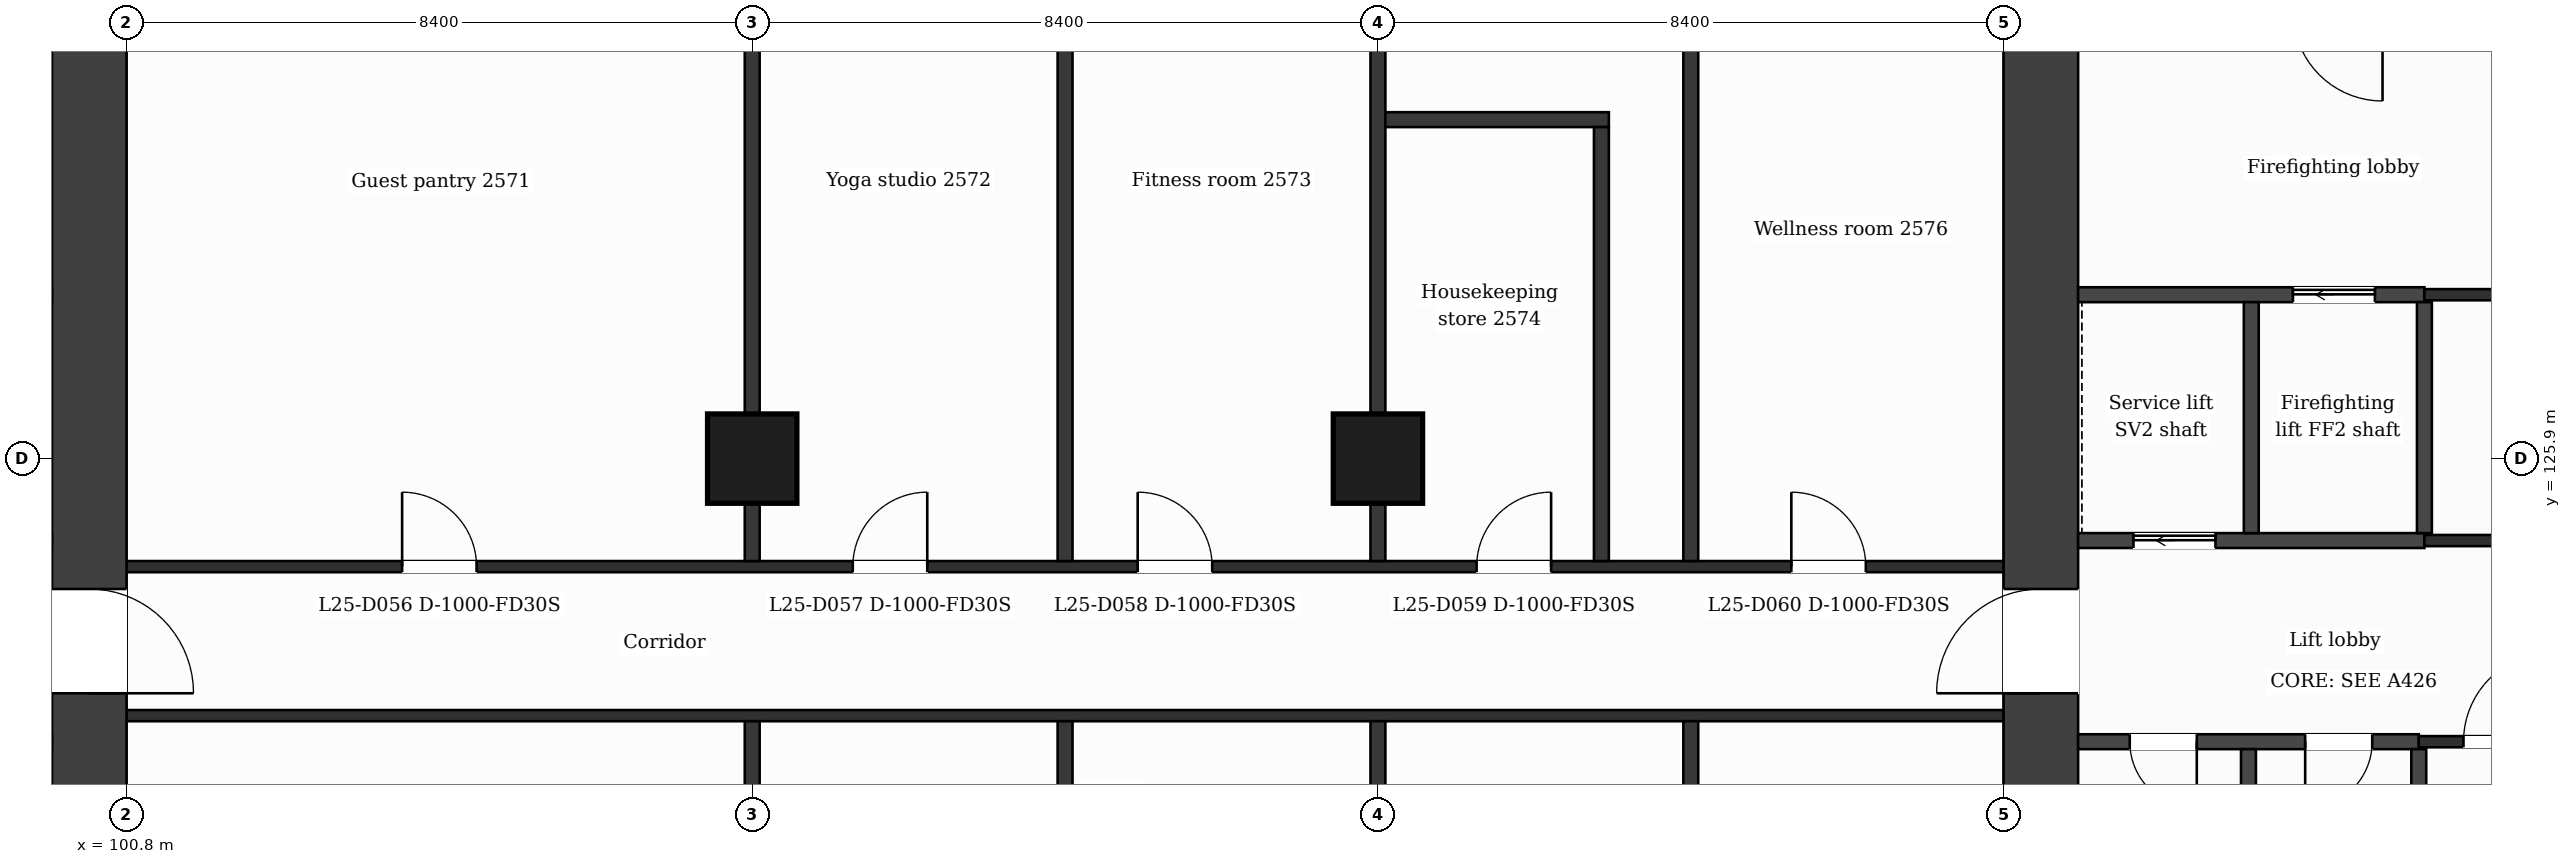
"""IFC4 building model, lengths in metres.
Left out: names, types, materials, properties, quantities, classifications, styles, units other than length and angle.
Written with IfcOpenShell. Run it as: python <this file> out.ifc"""

import sys

from ifc_helpers import new_model, si_unit, direction, frame, frame_2d, origin, origin_2d, place, context, subcontext, project, spatial, rectangle, extrude, element, fill, save


model = new_model("IFC4")
c1 = context("Model", 3, precision=1e-05, world=origin(), true_north=direction((0.0, 1.0)))
c2 = subcontext(c1, "Body", "Model", "MODEL_VIEW")
j1 = project(units=[si_unit("LENGTHUNIT", "METRE"), si_unit("PLANEANGLEUNIT", "RADIAN")], contexts=[c1])
p1 = place(None, origin())
s1 = spatial("IfcSite", under=j1, at=p1, CompositionType="ELEMENT")
p2 = place(p1, origin())
s2 = spatial("IfcBuilding", under=s1, at=p2, CompositionType="ELEMENT")
p3 = place(p2, frame((0.0, 0.0, 109.5)))
s3 = spatial("IfcBuildingStorey", under=s2, at=p3, CompositionType="ELEMENT", Elevation=109.5)
p4 = place(p3, frame((100.3, 131.9, 0.0), z_axis=(0.0, 0.0, 1.0), x_axis=(0.0, -1.0, 0.0)))
e1 = element("IfcWall", 1, at=p4, inside=s3, PredefinedType="SHEAR", context=c2, shape_type="SweptSolid", body=[
    extrude(rectangle(XDim=21.0, YDim=1.0, at=frame_2d((10.5, 0.0))), origin(), (0.0, 0.0, 1.0), 3.7),
])
p5 = place(p4, frame((7.75, 0.0, 0.0)))
e2 = element("IfcOpeningElement", 2, at=p5, cuts=e1, PredefinedType="OPENING", context=c2, shape_type="SweptSolid", body=[
    extrude(rectangle(XDim=1.4, YDim=2.1, at=frame_2d((0.7, 1.05))), frame((0.0, 0.51, 0.0), z_axis=(0.0, -1.0, 0.0), x_axis=(1.0, 0.0, 0.0)), (0.0, 0.0, 1.0), 1.02),
])
p6 = place(p3, frame((126.5, 110.9, 0.0), z_axis=(0.0, 0.0, 1.0), x_axis=(0.0, 1.0, 0.0)))
e3 = element("IfcWall", 3, at=p6, inside=s3, PredefinedType="SHEAR", context=c2, shape_type="SweptSolid", body=[
    extrude(rectangle(XDim=21.0, YDim=1.0, at=frame_2d((10.5, 0.0))), origin(), (0.0, 0.0, 1.0), 3.7),
])
p7 = place(p6, frame((11.85, 0.0, 0.0)))
e4 = element("IfcOpeningElement", 4, at=p7, cuts=e3, PredefinedType="OPENING", context=c2, shape_type="SweptSolid", body=[
    extrude(rectangle(XDim=1.4, YDim=2.1, at=frame_2d((0.7, 1.05))), frame((0.0, 0.51, 0.0), z_axis=(0.0, -1.0, 0.0), x_axis=(1.0, 0.0, 0.0)), (0.0, 0.0, 1.0), 1.02),
])
for number, where, z_axis, x_axis in (
    (5, (109.2, 125.9, 0.0), (0.0, 0.0, 1.0), (1.0, 0.0, 0.0)),
    (6, (117.6, 125.9, 0.0), (0.0, 0.0, 1.0), (1.0, 0.0, 0.0)),
):
    element("IfcColumn", number, at=place(p3, frame(where, z_axis=z_axis, x_axis=x_axis)), inside=s3, PredefinedType="COLUMN", context=c2, shape_type="SweptSolid", body=[
        extrude(rectangle(XDim=1.2, YDim=1.2, at=origin_2d()), origin(), (0.0, 0.0, 1.0), 3.7),
    ])
p8 = place(p3, frame((95.227, 122.1, 0.0), z_axis=(0.0, 0.0, 1.0), x_axis=(1.0, 0.0, 0.0)))
e7 = element("IfcWall", 7, at=p8, inside=s3, PredefinedType="PARTITIONING", context=c2, shape_type="SweptSolid", body=[
    extrude(rectangle(XDim=4.573, YDim=0.2, at=frame_2d((2.287, 0.0))), origin(), (0.0, 0.0, 1.0), 3.38),
])
p9 = place(p8, frame((0.693, 0.0, 0.0)))
e8 = element("IfcOpeningElement", 8, at=p9, cuts=e7, PredefinedType="OPENING", context=c2, shape_type="SweptSolid", body=[
    extrude(rectangle(XDim=0.9, YDim=2.1, at=frame_2d((0.45, 1.05))), frame((0.0, 0.11, 0.0), z_axis=(0.0, -1.0, 0.0), x_axis=(1.0, 0.0, 0.0)), (0.0, 0.0, 1.0), 0.22),
])
p10 = place(p8, frame((3.151, 0.0, 0.0)))
e9 = element("IfcOpeningElement", 9, at=p10, cuts=e7, PredefinedType="OPENING", context=c2, shape_type="SweptSolid", body=[
    extrude(rectangle(XDim=0.9, YDim=2.1, at=frame_2d((0.45, 1.05))), frame((0.0, 0.11, 0.0), z_axis=(0.0, -1.0, 0.0), x_axis=(1.0, 0.0, 0.0)), (0.0, 0.0, 1.0), 0.22),
])
p11 = place(p3, frame((127.0, 122.1, 0.0), z_axis=(0.0, 0.0, 1.0), x_axis=(1.0, 0.0, 0.0)))
e10 = element("IfcWall", 10, at=p11, inside=s3, PredefinedType="PARTITIONING", context=c2, shape_type="SweptSolid", body=[
    extrude(rectangle(XDim=4.573, YDim=0.2, at=frame_2d((2.287, 0.0))), origin(), (0.0, 0.0, 1.0), 3.38),
])
p12 = place(p11, frame((3.048, 0.0, 0.0)))
e11 = element("IfcOpeningElement", 11, at=p12, cuts=e10, PredefinedType="OPENING", context=c2, shape_type="SweptSolid", body=[
    extrude(rectangle(XDim=0.9, YDim=2.1, at=frame_2d((0.45, 1.05))), frame((0.0, 0.11, 0.0), z_axis=(0.0, -1.0, 0.0), x_axis=(1.0, 0.0, 0.0)), (0.0, 0.0, 1.0), 0.22),
])
p13 = place(p11, frame((0.693, 0.0, 0.0)))
e12 = element("IfcOpeningElement", 12, at=p13, cuts=e10, PredefinedType="OPENING", context=c2, shape_type="SweptSolid", body=[
    extrude(rectangle(XDim=0.9, YDim=2.1, at=frame_2d((0.45, 1.05))), frame((0.0, 0.11, 0.0), z_axis=(0.0, -1.0, 0.0), x_axis=(1.0, 0.0, 0.0)), (0.0, 0.0, 1.0), 0.22),
])
p14 = place(p3, frame((131.573, 122.1, 0.0), z_axis=(0.0, 0.0, 1.0), x_axis=(1.0, 0.0, 0.0)))
e13 = element("IfcWall", 13, at=p14, inside=s3, PredefinedType="PARTITIONING", context=c2, shape_type="SweptSolid", body=[
    extrude(rectangle(XDim=2.4, YDim=0.15, at=frame_2d((1.2, 0.0))), origin(), (0.0, 0.0, 1.0), 3.38),
])
p15 = place(p14, frame((0.6, 0.0, 0.0)))
e14 = element("IfcOpeningElement", 14, at=p15, cuts=e13, PredefinedType="OPENING", context=c2, shape_type="SweptSolid", body=[
    extrude(rectangle(XDim=1.2, YDim=2.1, at=frame_2d((0.6, 1.05))), frame((0.0, 0.085, 0.0), z_axis=(0.0, -1.0, 0.0), x_axis=(1.0, 0.0, 0.0)), (0.0, 0.0, 1.0), 0.17),
])
p16 = place(p3, frame((100.8, 122.45, 0.0), z_axis=(0.0, 0.0, 1.0), x_axis=(1.0, 0.0, 0.0)))
e15 = element("IfcWall", 15, at=p16, inside=s3, PredefinedType="PARTITIONING", context=c2, shape_type="SweptSolid", body=[
    extrude(rectangle(XDim=25.2, YDim=0.15, at=frame_2d((12.6, 0.0))), origin(), (0.0, 0.0, 1.0), 3.38),
])
p17 = place(p3, frame((100.8, 124.45, 0.0), z_axis=(0.0, 0.0, 1.0), x_axis=(1.0, 0.0, 0.0)))
e16 = element("IfcWall", 16, at=p17, inside=s3, PredefinedType="PARTITIONING", context=c2, shape_type="SweptSolid", body=[
    extrude(rectangle(XDim=25.2, YDim=0.15, at=frame_2d((12.6, 0.0))), origin(), (0.0, 0.0, 1.0), 3.38),
])
p18 = place(p17, frame((3.7, 0.0, 0.0)))
e17 = element("IfcOpeningElement", 17, at=p18, cuts=e16, PredefinedType="OPENING", context=c2, shape_type="SweptSolid", body=[
    extrude(rectangle(XDim=1.0, YDim=2.1, at=frame_2d((0.5, 1.05))), frame((0.0, 0.085, 0.0), z_axis=(0.0, -1.0, 0.0), x_axis=(1.0, 0.0, 0.0)), (0.0, 0.0, 1.0), 0.17),
])
p19 = place(p17, frame((9.75, 0.0, 0.0)))
e18 = element("IfcOpeningElement", 18, at=p19, cuts=e16, PredefinedType="OPENING", context=c2, shape_type="SweptSolid", body=[
    extrude(rectangle(XDim=1.0, YDim=2.1, at=frame_2d((0.5, 1.05))), frame((0.0, 0.085, 0.0), z_axis=(0.0, -1.0, 0.0), x_axis=(1.0, 0.0, 0.0)), (0.0, 0.0, 1.0), 0.17),
])
p20 = place(p17, frame((13.575, 0.0, 0.0)))
e19 = element("IfcOpeningElement", 19, at=p20, cuts=e16, PredefinedType="OPENING", context=c2, shape_type="SweptSolid", body=[
    extrude(rectangle(XDim=1.0, YDim=2.1, at=frame_2d((0.5, 1.05))), frame((0.0, 0.085, 0.0), z_axis=(0.0, -1.0, 0.0), x_axis=(1.0, 0.0, 0.0)), (0.0, 0.0, 1.0), 0.17),
])
p21 = place(p17, frame((18.125, 0.0, 0.0)))
e20 = element("IfcOpeningElement", 20, at=p21, cuts=e16, PredefinedType="OPENING", context=c2, shape_type="SweptSolid", body=[
    extrude(rectangle(XDim=1.0, YDim=2.1, at=frame_2d((0.5, 1.05))), frame((0.0, 0.085, 0.0), z_axis=(0.0, -1.0, 0.0), x_axis=(1.0, 0.0, 0.0)), (0.0, 0.0, 1.0), 0.17),
])
p22 = place(p17, frame((22.35, 0.0, 0.0)))
e21 = element("IfcOpeningElement", 21, at=p22, cuts=e16, PredefinedType="OPENING", context=c2, shape_type="SweptSolid", body=[
    extrude(rectangle(XDim=1.0, YDim=2.1, at=frame_2d((0.5, 1.05))), frame((0.0, 0.085, 0.0), z_axis=(0.0, -1.0, 0.0), x_axis=(1.0, 0.0, 0.0)), (0.0, 0.0, 1.0), 0.17),
])
p23 = place(p3, frame((127.0, 124.8, 0.0), z_axis=(0.0, 0.0, 1.0), x_axis=(1.0, 0.0, 0.0)))
e22 = element("IfcWall", 22, at=p23, inside=s3, PredefinedType="PARTITIONING", context=c2, shape_type="SweptSolid", body=[
    extrude(rectangle(XDim=4.649, YDim=0.2, at=frame_2d((2.324, 0.0))), origin(), (0.0, 0.0, 1.0), 3.38),
])
p24 = place(p23, frame((0.743, 0.0, 0.0)))
e23 = element("IfcOpeningElement", 23, at=p24, cuts=e22, PredefinedType="OPENING", context=c2, shape_type="SweptSolid", body=[
    extrude(rectangle(XDim=1.1, YDim=2.1, at=frame_2d((0.55, 1.05))), frame((0.0, 0.11, 0.0), z_axis=(0.0, -1.0, 0.0), x_axis=(1.0, 0.0, 0.0)), (0.0, 0.0, 1.0), 0.22),
])
p25 = place(p3, frame((131.649, 124.8, 0.0), z_axis=(0.0, 0.0, 1.0), x_axis=(1.0, 0.0, 0.0)))
e24 = element("IfcWall", 24, at=p25, inside=s3, PredefinedType="PARTITIONING", context=c2, shape_type="SweptSolid", body=[
    extrude(rectangle(XDim=2.449, YDim=0.15, at=frame_2d((1.225, 0.0))), origin(), (0.0, 0.0, 1.0), 3.38),
])
p26 = place(p3, frame((127.0, 128.1, 0.0), z_axis=(0.0, 0.0, 1.0), x_axis=(1.0, 0.0, 0.0)))
e25 = element("IfcWall", 25, at=p26, inside=s3, PredefinedType="PARTITIONING", context=c2, shape_type="SweptSolid", body=[
    extrude(rectangle(XDim=4.649, YDim=0.2, at=frame_2d((2.324, 0.0))), origin(), (0.0, 0.0, 1.0), 3.38),
])
p27 = place(p26, frame((2.884, 0.0, 0.0)))
e26 = element("IfcOpeningElement", 26, at=p27, cuts=e25, PredefinedType="OPENING", context=c2, shape_type="SweptSolid", body=[
    extrude(rectangle(XDim=1.1, YDim=2.1, at=frame_2d((0.55, 1.05))), frame((0.0, 0.11, 0.0), z_axis=(0.0, -1.0, 0.0), x_axis=(1.0, 0.0, 0.0)), (0.0, 0.0, 1.0), 0.22),
])
p28 = place(p3, frame((131.649, 128.1, 0.0), z_axis=(0.0, 0.0, 1.0), x_axis=(1.0, 0.0, 0.0)))
e27 = element("IfcWall", 27, at=p28, inside=s3, PredefinedType="PARTITIONING", context=c2, shape_type="SweptSolid", body=[
    extrude(rectangle(XDim=2.324, YDim=0.15, at=frame_2d((1.162, 0.0))), origin(), (0.0, 0.0, 1.0), 3.38),
])
p29 = place(p3, frame((117.6, 130.45, 0.0), z_axis=(0.0, 0.0, 1.0), x_axis=(1.0, 0.0, 0.0)))
e28 = element("IfcWall", 28, at=p29, inside=s3, PredefinedType="PARTITIONING", context=c2, shape_type="SweptSolid", body=[
    extrude(rectangle(XDim=3.1, YDim=0.2, at=frame_2d((1.55, 0.0))), origin(), (0.0, 0.0, 1.0), 3.38),
])
p30 = place(p3, frame((109.2, 109.075, 0.0), z_axis=(0.0, 0.0, 1.0), x_axis=(0.0, 1.0, 0.0)))
e29 = element("IfcWall", 29, at=p30, inside=s3, PredefinedType="PARTITIONING", context=c2, shape_type="SweptSolid", body=[
    extrude(rectangle(XDim=13.3, YDim=0.2, at=frame_2d((6.65, 0.0))), origin(), (0.0, 0.0, 1.0), 3.38),
])
p31 = place(p3, frame((109.2, 124.525, 0.0), z_axis=(0.0, 0.0, 1.0), x_axis=(0.0, 1.0, 0.0)))
e30 = element("IfcWall", 30, at=p31, inside=s3, PredefinedType="PARTITIONING", context=c2, shape_type="SweptSolid", body=[
    extrude(rectangle(XDim=9.2, YDim=0.2, at=frame_2d((4.6, 0.0))), origin(), (0.0, 0.0, 1.0), 3.38),
])
p32 = place(p3, frame((113.4, 109.075, 0.0), z_axis=(0.0, 0.0, 1.0), x_axis=(0.0, 1.0, 0.0)))
e31 = element("IfcWall", 31, at=p32, inside=s3, PredefinedType="PARTITIONING", context=c2, shape_type="SweptSolid", body=[
    extrude(rectangle(XDim=13.3, YDim=0.2, at=frame_2d((6.65, 0.0))), origin(), (0.0, 0.0, 1.0), 3.38),
])
p33 = place(p3, frame((113.4, 124.525, 0.0), z_axis=(0.0, 0.0, 1.0), x_axis=(0.0, 1.0, 0.0)))
e32 = element("IfcWall", 32, at=p33, inside=s3, PredefinedType="PARTITIONING", context=c2, shape_type="SweptSolid", body=[
    extrude(rectangle(XDim=9.2, YDim=0.2, at=frame_2d((4.6, 0.0))), origin(), (0.0, 0.0, 1.0), 3.38),
])
p34 = place(p3, frame((117.6, 109.075, 0.0), z_axis=(0.0, 0.0, 1.0), x_axis=(0.0, 1.0, 0.0)))
e33 = element("IfcWall", 33, at=p34, inside=s3, PredefinedType="PARTITIONING", context=c2, shape_type="SweptSolid", body=[
    extrude(rectangle(XDim=13.3, YDim=0.2, at=frame_2d((6.65, 0.0))), origin(), (0.0, 0.0, 1.0), 3.38),
])
p35 = place(p3, frame((117.6, 124.525, 0.0), z_axis=(0.0, 0.0, 1.0), x_axis=(0.0, 1.0, 0.0)))
e34 = element("IfcWall", 34, at=p35, inside=s3, PredefinedType="PARTITIONING", context=c2, shape_type="SweptSolid", body=[
    extrude(rectangle(XDim=9.2, YDim=0.2, at=frame_2d((4.6, 0.0))), origin(), (0.0, 0.0, 1.0), 3.38),
])
p36 = place(p3, frame((120.6, 124.525, 0.0), z_axis=(0.0, 0.0, 1.0), x_axis=(0.0, 1.0, 0.0)))
e35 = element("IfcWall", 35, at=p36, inside=s3, PredefinedType="PARTITIONING", context=c2, shape_type="SweptSolid", body=[
    extrude(rectangle(XDim=5.825, YDim=0.2, at=frame_2d((2.913, 0.0))), origin(), (0.0, 0.0, 1.0), 3.38),
])
p37 = place(p3, frame((121.8, 109.075, 0.0), z_axis=(0.0, 0.0, 1.0), x_axis=(0.0, 1.0, 0.0)))
e36 = element("IfcWall", 36, at=p37, inside=s3, PredefinedType="PARTITIONING", context=c2, shape_type="SweptSolid", body=[
    extrude(rectangle(XDim=13.3, YDim=0.2, at=frame_2d((6.65, 0.0))), origin(), (0.0, 0.0, 1.0), 3.38),
])
p38 = place(p3, frame((121.8, 124.525, 0.0), z_axis=(0.0, 0.0, 1.0), x_axis=(0.0, 1.0, 0.0)))
e37 = element("IfcWall", 37, at=p38, inside=s3, PredefinedType="PARTITIONING", context=c2, shape_type="SweptSolid", body=[
    extrude(rectangle(XDim=9.2, YDim=0.2, at=frame_2d((4.6, 0.0))), origin(), (0.0, 0.0, 1.0), 3.38),
])
for number, where, z_axis, x_axis in (
    (38, (129.287, 118.9, 0.0), (0.0, 0.0, 1.0), (0.0, 1.0, 0.0)),
    (39, (129.324, 124.9, 0.0), (0.0, 0.0, 1.0), (0.0, 1.0, 0.0)),
):
    element("IfcWall", number, at=place(p3, frame(where, z_axis=z_axis, x_axis=x_axis)), inside=s3, PredefinedType="PARTITIONING", context=c2, shape_type="SweptSolid", body=[
        extrude(rectangle(XDim=3.1, YDim=0.2, at=frame_2d((1.55, 0.0))), origin(), (0.0, 0.0, 1.0), 3.38),
    ])
p39 = place(p3, frame((131.573, 116.97, 0.0), z_axis=(0.0, 0.0, 1.0), x_axis=(0.0, 1.0, 0.0)))
e40 = element("IfcWall", 40, at=p39, inside=s3, PredefinedType="PARTITIONING", context=c2, shape_type="SweptSolid", body=[
    extrude(rectangle(XDim=5.03, YDim=0.2, at=frame_2d((2.515, 0.0))), origin(), (0.0, 0.0, 1.0), 3.38),
])
p40 = place(p39, frame((0.58, 0.0, 0.0)))
e41 = element("IfcOpeningElement", 41, at=p40, cuts=e40, PredefinedType="OPENING", context=c2, shape_type="SweptSolid", body=[
    extrude(rectangle(XDim=0.9, YDim=2.1, at=frame_2d((0.45, 1.05))), frame((0.0, 0.11, 0.0), z_axis=(0.0, -1.0, 0.0), x_axis=(1.0, 0.0, 0.0)), (0.0, 0.0, 1.0), 0.22),
])
p41 = place(p3, frame((131.649, 124.9, 0.0), z_axis=(0.0, 0.0, 1.0), x_axis=(0.0, 1.0, 0.0)))
e42 = element("IfcWall", 42, at=p41, inside=s3, PredefinedType="PARTITIONING", context=c2, shape_type="SweptSolid", body=[
    extrude(rectangle(XDim=3.1, YDim=0.2, at=frame_2d((1.55, 0.0))), origin(), (0.0, 0.0, 1.0), 3.38),
])
p42 = place(p15, origin())
e43 = element("IfcDoor", 43, at=p42, inside=s3, OperationType="SINGLE_SWING_RIGHT", PredefinedType="DOOR", context=c2, shape_type="SweptSolid", body=[
    extrude(rectangle(XDim=1.2, YDim=2.1, at=frame_2d((0.6, 1.05))), frame((0.0, 0.025, 0.0), z_axis=(0.0, -1.0, 0.0), x_axis=(1.0, 0.0, 0.0)), (0.0, 0.0, 1.0), 0.05),
])
fill(e14, e43)
p43 = place(p27, origin())
e44 = element("IfcDoor", 44, at=p43, inside=s3, OperationType="SLIDING_TO_LEFT", PredefinedType="DOOR", context=c2, shape_type="SweptSolid", body=[
    extrude(rectangle(XDim=1.1, YDim=2.1, at=frame_2d((0.55, 1.05))), frame((0.0, 0.025, 0.0), z_axis=(0.0, -1.0, 0.0), x_axis=(1.0, 0.0, 0.0)), (0.0, 0.0, 1.0), 0.05),
])
fill(e26, e44)
p44 = place(p24, origin())
e45 = element("IfcDoor", 45, at=p44, inside=s3, OperationType="SLIDING_TO_LEFT", PredefinedType="DOOR", context=c2, shape_type="SweptSolid", body=[
    extrude(rectangle(XDim=1.1, YDim=2.1, at=frame_2d((0.55, 1.05))), frame((0.0, 0.025, 0.0), z_axis=(0.0, -1.0, 0.0), x_axis=(1.0, 0.0, 0.0)), (0.0, 0.0, 1.0), 0.05),
])
fill(e23, e45)
p45 = place(p12, origin())
e46 = element("IfcDoor", 46, at=p45, inside=s3, OperationType="SINGLE_SWING_LEFT", PredefinedType="DOOR", context=c2, shape_type="SweptSolid", body=[
    extrude(rectangle(XDim=0.9, YDim=2.1, at=frame_2d((0.45, 1.05))), frame((0.0, 0.025, 0.0), z_axis=(0.0, -1.0, 0.0), x_axis=(1.0, 0.0, 0.0)), (0.0, 0.0, 1.0), 0.05),
])
fill(e11, e46)
p46 = place(p13, origin())
e47 = element("IfcDoor", 47, at=p46, inside=s3, OperationType="SINGLE_SWING_RIGHT", PredefinedType="DOOR", context=c2, shape_type="SweptSolid", body=[
    extrude(rectangle(XDim=0.9, YDim=2.1, at=frame_2d((0.45, 1.05))), frame((0.0, 0.025, 0.0), z_axis=(0.0, -1.0, 0.0), x_axis=(1.0, 0.0, 0.0)), (0.0, 0.0, 1.0), 0.05),
])
fill(e12, e47)
p47 = place(p18, origin())
e48 = element("IfcDoor", 48, at=p47, inside=s3, OperationType="SINGLE_SWING_LEFT", PredefinedType="DOOR", context=c2, shape_type="SweptSolid", body=[
    extrude(rectangle(XDim=1.0, YDim=2.1, at=frame_2d((0.5, 1.05))), frame((0.0, 0.025, 0.0), z_axis=(0.0, -1.0, 0.0), x_axis=(1.0, 0.0, 0.0)), (0.0, 0.0, 1.0), 0.05),
])
fill(e17, e48)
p48 = place(p19, origin())
e49 = element("IfcDoor", 49, at=p48, inside=s3, OperationType="SINGLE_SWING_RIGHT", PredefinedType="DOOR", context=c2, shape_type="SweptSolid", body=[
    extrude(rectangle(XDim=1.0, YDim=2.1, at=frame_2d((0.5, 1.05))), frame((0.0, 0.025, 0.0), z_axis=(0.0, -1.0, 0.0), x_axis=(1.0, 0.0, 0.0)), (0.0, 0.0, 1.0), 0.05),
])
fill(e18, e49)
p49 = place(p20, origin())
e50 = element("IfcDoor", 50, at=p49, inside=s3, OperationType="SINGLE_SWING_LEFT", PredefinedType="DOOR", context=c2, shape_type="SweptSolid", body=[
    extrude(rectangle(XDim=1.0, YDim=2.1, at=frame_2d((0.5, 1.05))), frame((0.0, 0.025, 0.0), z_axis=(0.0, -1.0, 0.0), x_axis=(1.0, 0.0, 0.0)), (0.0, 0.0, 1.0), 0.05),
])
fill(e19, e50)
p50 = place(p21, origin())
e51 = element("IfcDoor", 51, at=p50, inside=s3, OperationType="SINGLE_SWING_RIGHT", PredefinedType="DOOR", context=c2, shape_type="SweptSolid", body=[
    extrude(rectangle(XDim=1.0, YDim=2.1, at=frame_2d((0.5, 1.05))), frame((0.0, 0.025, 0.0), z_axis=(0.0, -1.0, 0.0), x_axis=(1.0, 0.0, 0.0)), (0.0, 0.0, 1.0), 0.05),
])
fill(e20, e51)
p51 = place(p22, origin())
e52 = element("IfcDoor", 52, at=p51, inside=s3, OperationType="SINGLE_SWING_LEFT", PredefinedType="DOOR", context=c2, shape_type="SweptSolid", body=[
    extrude(rectangle(XDim=1.0, YDim=2.1, at=frame_2d((0.5, 1.05))), frame((0.0, 0.025, 0.0), z_axis=(0.0, -1.0, 0.0), x_axis=(1.0, 0.0, 0.0)), (0.0, 0.0, 1.0), 0.05),
])
fill(e21, e52)
p52 = place(p5, origin())
e53 = element("IfcDoor", 53, at=p52, inside=s3, OperationType="SINGLE_SWING_RIGHT", PredefinedType="DOOR", context=c2, shape_type="SweptSolid", body=[
    extrude(rectangle(XDim=1.4, YDim=2.1, at=frame_2d((0.7, 1.05))), frame((0.0, 0.025, 0.0), z_axis=(0.0, -1.0, 0.0), x_axis=(1.0, 0.0, 0.0)), (0.0, 0.0, 1.0), 0.05),
])
fill(e2, e53)
p53 = place(p7, origin())
e54 = element("IfcDoor", 54, at=p53, inside=s3, OperationType="SINGLE_SWING_LEFT", PredefinedType="DOOR", context=c2, shape_type="SweptSolid", body=[
    extrude(rectangle(XDim=1.4, YDim=2.1, at=frame_2d((0.7, 1.05))), frame((0.0, 0.025, 0.0), z_axis=(0.0, -1.0, 0.0), x_axis=(1.0, 0.0, 0.0)), (0.0, 0.0, 1.0), 0.05),
])
fill(e4, e54)
save(model, sys.argv[1])
